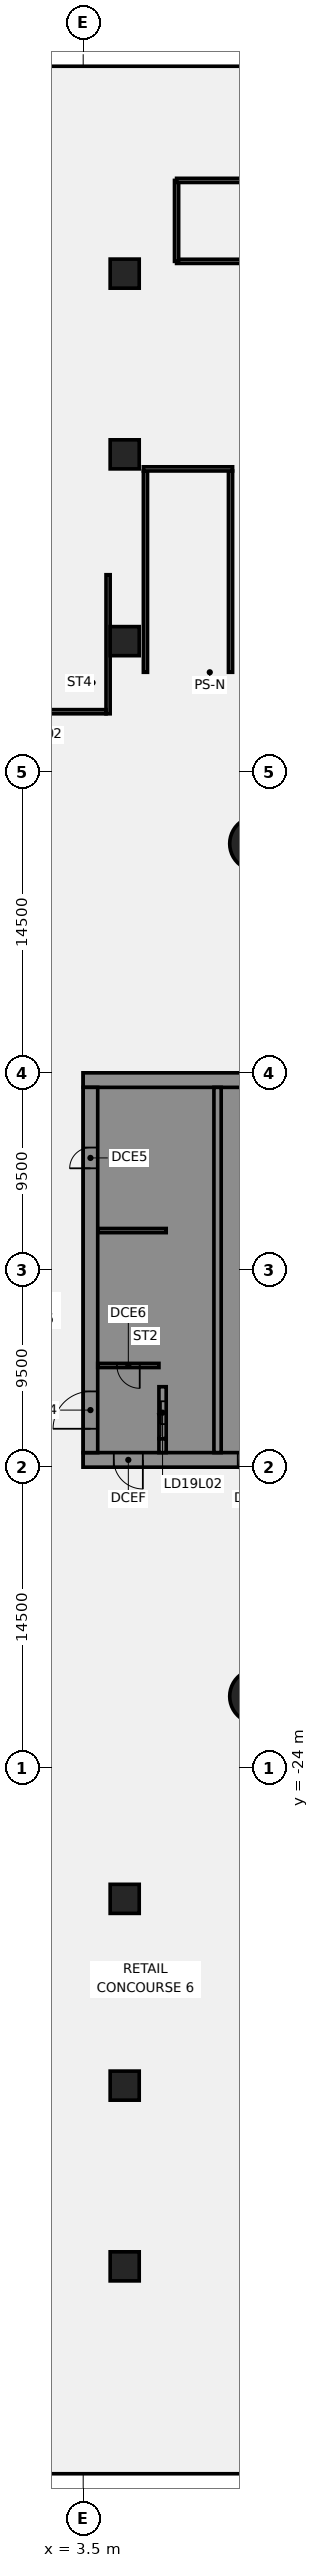
"""IFC4 building model, lengths in metres.
Left out: names, types, materials, properties, quantities, classifications, styles, units other than length and angle.
Written with IfcOpenShell. Run it as: python <this file> out.ifc"""

import sys

from ifc_helpers import new_model, si_unit, direction, frame, frame_2d, origin, origin_2d, place, context, subcontext, project, spatial, polyline, rectangle, circle, outline, extrude, element, fill, save


model = new_model("IFC4")
c1 = context("Model", 3, precision=1e-05, world=origin(), true_north=direction((0.0, 1.0)))
c2 = subcontext(c1, "Body", "Model", "MODEL_VIEW")
j1 = project(units=[si_unit("LENGTHUNIT", "METRE"), si_unit("PLANEANGLEUNIT", "RADIAN")], contexts=[c1])
p1 = place(None, origin())
s1 = spatial("IfcSite", under=j1, at=p1, CompositionType="ELEMENT")
p2 = place(p1, origin())
s2 = spatial("IfcBuilding", under=s1, at=p2, CompositionType="ELEMENT")
p3 = place(p2, frame((0.0, 0.0, 15.0)))
s3 = spatial("IfcBuildingStorey", under=s2, at=p3, CompositionType="ELEMENT", Elevation=15.0)
for number, where, z_axis, x_axis in (
    (1, (11.86, 20.543, -0.5), (0.0, 0.0, 1.0), (1.0, 0.0, 0.0)),
    (2, (11.86, -20.543, -0.5), (0.0, 0.0, 1.0), (1.0, 0.0, 0.0)),
):
    element("IfcColumn", number, at=place(p3, frame(where, z_axis=z_axis, x_axis=x_axis)), inside=s3, PredefinedType="COLUMN", context=c2, shape_type="SweptSolid", body=[
        extrude(circle(Radius=1.3, at=origin_2d()), origin(), (0.0, 0.0, 1.0), 5.0),
    ])
for number, where, z_axis, x_axis in (
    (3, (5.5, 39.3, -0.5), (0.0, 0.0, 1.0), (1.0, 0.0, 0.0)),
    (4, (5.5, 30.3, -0.5), (0.0, 0.0, 1.0), (1.0, 0.0, 0.0)),
    (5, (5.5, 48.008, -0.5), (0.0, 0.0, 1.0), (1.0, 0.0, 0.0)),
    (6, (5.5, -39.3, -0.5), (0.0, 0.0, 1.0), (1.0, 0.0, 0.0)),
    (7, (5.5, -30.3, -0.5), (0.0, 0.0, 1.0), (1.0, 0.0, 0.0)),
    (8, (5.5, -48.008, -0.5), (0.0, 0.0, 1.0), (1.0, 0.0, 0.0)),
):
    element("IfcColumn", number, at=place(p3, frame(where, z_axis=z_axis, x_axis=x_axis)), inside=s3, PredefinedType="COLUMN", context=c2, shape_type="SweptSolid", body=[
        extrude(rectangle(XDim=1.4, YDim=1.4, at=origin_2d()), origin(), (0.0, 0.0, 1.0), 5.0),
    ])
p4 = place(p3, frame((8.0, 48.6, 0.0), z_axis=(0.0, 0.0, 1.0), x_axis=(1.0, 0.0, 0.0)))
e9 = element("IfcWall", 9, at=p4, inside=s3, PredefinedType="PARTITIONING", context=c2, shape_type="SweptSolid", body=[
    extrude(rectangle(XDim=11.5, YDim=0.2, at=frame_2d((5.75, 0.0))), origin(), (0.0, 0.0, 1.0), 4.5),
])
p5 = place(p4, frame((9.78, 0.0, 0.0)))
e10 = element("IfcOpeningElement", 10, at=p5, cuts=e9, PredefinedType="OPENING", context=c2, shape_type="SweptSolid", body=[
    extrude(rectangle(XDim=1.2, YDim=2.1, at=frame_2d((0.6, 1.05))), frame((0.0, 0.11, 0.0), z_axis=(0.0, -1.0, 0.0), x_axis=(1.0, 0.0, 0.0)), (0.0, 0.0, 1.0), 0.22),
])
p6 = place(p3, frame((8.0, 48.6, 0.0), z_axis=(0.0, 0.0, 1.0), x_axis=(0.0, 1.0, 0.0)))
e11 = element("IfcWall", 11, at=p6, inside=s3, PredefinedType="PARTITIONING", context=c2, shape_type="SweptSolid", body=[
    extrude(rectangle(XDim=3.9, YDim=0.2, at=frame_2d((1.95, 0.0))), origin(), (0.0, 0.0, 1.0), 4.5),
])
p7 = place(p3, frame((8.0, 52.5, 0.0), z_axis=(0.0, 0.0, 1.0), x_axis=(1.0, 0.0, 0.0)))
e12 = element("IfcWall", 12, at=p7, inside=s3, PredefinedType="PARTITIONING", context=c2, shape_type="SweptSolid", body=[
    extrude(rectangle(XDim=11.5, YDim=0.2, at=frame_2d((5.75, 0.0))), origin(), (0.0, 0.0, 1.0), 4.5),
])
for number, where, z_axis, x_axis in (
    (13, (10.6, 28.8, 0.0), (0.0, 0.0, 1.0), (0.0, 1.0, 0.0)),
    (14, (6.5, 28.8, 0.0), (0.0, 0.0, 1.0), (0.0, 1.0, 0.0)),
):
    element("IfcWall", number, at=place(p3, frame(where, z_axis=z_axis, x_axis=x_axis)), inside=s3, PredefinedType="SOLIDWALL", context=c2, shape_type="SweptSolid", body=[
        extrude(rectangle(XDim=9.7, YDim=0.2, at=frame_2d((4.85, 0.0))), origin(), (0.0, 0.0, 1.0), 4.5),
    ])
p8 = place(p3, frame((10.7, 38.6, 0.0), z_axis=(0.0, 0.0, 1.0), x_axis=(-1.0, 0.0, 0.0)))
e15 = element("IfcWall", 15, at=p8, inside=s3, PredefinedType="SOLIDWALL", context=c2, shape_type="SweptSolid", body=[
    extrude(rectangle(XDim=4.3, YDim=0.2, at=frame_2d((2.15, 0.0))), origin(), (0.0, 0.0, 1.0), 4.5),
])
p9 = place(p3, frame((16.5, -9.15, 0.0), z_axis=(0.0, 0.0, 1.0), x_axis=(-1.0, 0.0, 0.0)))
e16 = element("IfcWall", 16, at=p9, inside=s3, PredefinedType="SHEAR", context=c2, shape_type="SweptSolid", body=[
    extrude(rectangle(XDim=13.0, YDim=0.7, at=frame_2d((6.5, 0.0))), origin(), (0.0, 0.0, 1.0), 4.5),
])
p10 = place(p9, frame((4.15, 0.0, 0.0)))
e17 = element("IfcOpeningElement", 17, at=p10, cuts=e16, PredefinedType="OPENING", context=c2, shape_type="SweptSolid", body=[
    extrude(rectangle(XDim=1.4, YDim=2.1, at=frame_2d((0.7, 1.05))), frame((0.0, 0.36, 0.0), z_axis=(0.0, -1.0, 0.0), x_axis=(1.0, 0.0, 0.0)), (0.0, 0.0, 1.0), 0.72),
])
p11 = place(p9, frame((10.125, 0.0, 0.0)))
e18 = element("IfcOpeningElement", 18, at=p11, cuts=e16, PredefinedType="OPENING", context=c2, shape_type="SweptSolid", body=[
    extrude(rectangle(XDim=1.4, YDim=2.1, at=frame_2d((0.7, 1.05))), frame((0.0, 0.36, 0.0), z_axis=(0.0, -1.0, 0.0), x_axis=(1.0, 0.0, 0.0)), (0.0, 0.0, 1.0), 0.72),
])
p12 = place(p3, frame((16.5, 9.15, 0.0), z_axis=(0.0, 0.0, 1.0), x_axis=(-1.0, 0.0, 0.0)))
e19 = element("IfcWall", 19, at=p12, inside=s3, PredefinedType="SHEAR", context=c2, shape_type="SweptSolid", body=[
    extrude(rectangle(XDim=13.0, YDim=0.7, at=frame_2d((6.5, 0.0))), origin(), (0.0, 0.0, 1.0), 4.5),
])
p13 = place(p3, origin())
e20 = element("IfcWall", 20, at=p13, inside=s3, PredefinedType="SHEAR", context=c2, shape_type="SweptSolid", body=[
    extrude(outline(polyline([(9.8, -5.375), (7.5, -5.375), (7.5, -2.875), (9.8, -2.875), (9.8, -2.625), (7.5, -2.625), (7.5, -0.125), (9.8, -0.125), (9.8, 0.125), (7.5, 0.125), (7.5, 2.625), (9.8, 2.625), (9.8, 2.875), (7.5, 2.875), (7.5, 5.375), (9.8, 5.375), (9.8, 5.625), (7.5, 5.625), (7.5, 8.125), (9.8, 8.125), (9.8, 8.8), (7.5, 8.8), (7.15, 8.8), (7.15, -5.625), (7.5, -5.625), (9.8, -5.625), (9.8, -5.375)])), origin(), (0.0, 0.0, 1.0), 4.5),
])
p14 = place(p3, origin())
e21 = element("IfcWall", 21, at=p14, inside=s3, PredefinedType="SHEAR", context=c2, shape_type="SweptSolid", body=[
    extrude(outline(polyline([(7.5, -8.125), (7.5, -8.8), (9.8, -8.8), (9.8, -8.125), (9.8, -5.625), (9.55, -5.625), (9.55, -8.125), (7.5, -8.125)])), origin(), (0.0, 0.0, 1.0), 4.5),
])
p15 = place(p3, frame((7.325, -8.8, 0.0), z_axis=(0.0, 0.0, 1.0), x_axis=(0.0, 1.0, 0.0)))
e22 = element("IfcWall", 22, at=p15, inside=s3, PredefinedType="SHEAR", context=c2, shape_type="SweptSolid", body=[
    extrude(rectangle(XDim=0.675, YDim=0.35, at=frame_2d((0.337, 0.0))), origin(), (0.0, 0.0, 1.0), 4.5),
])
p16 = place(p3, frame((7.5, 1.9, 0.0), z_axis=(0.0, 0.0, 1.0), x_axis=(-1.0, 0.0, 0.0)))
e23 = element("IfcWall", 23, at=p16, inside=s3, PredefinedType="SHEAR", context=c2, shape_type="SweptSolid", body=[
    extrude(rectangle(XDim=3.3, YDim=0.2, at=frame_2d((1.65, 0.0))), origin(), (0.0, 0.0, 1.0), 4.5),
])
p17 = place(p3, frame((9.975, -8.8, 0.0), z_axis=(0.0, 0.0, 1.0), x_axis=(0.0, 1.0, 0.0)))
e24 = element("IfcWall", 24, at=p17, inside=s3, PredefinedType="SHEAR", context=c2, shape_type="SweptSolid", body=[
    extrude(rectangle(XDim=17.6, YDim=0.35, at=frame_2d((8.8, 0.0))), origin(), (0.0, 0.0, 1.0), 4.5),
])
p18 = place(p3, frame((7.325, -8.125, 0.0), z_axis=(0.0, 0.0, 1.0), x_axis=(0.0, 1.0, 0.0)))
e25 = element("IfcWall", 25, at=p18, inside=s3, PredefinedType="SHEAR", context=c2, shape_type="SweptSolid", body=[
    extrude(rectangle(XDim=2.5, YDim=0.35, at=frame_2d((1.25, 0.0))), origin(), (0.0, 0.0, 1.0), 4.5),
])
p19 = place(p18, frame((0.7, 0.0, 0.0)))
e26 = element("IfcOpeningElement", 26, at=p19, cuts=e25, PredefinedType="OPENING", context=c2, shape_type="SweptSolid", body=[
    extrude(rectangle(XDim=1.1, YDim=2.1, at=frame_2d((0.55, 1.05))), frame((0.0, 0.185, 0.0), z_axis=(0.0, -1.0, 0.0), x_axis=(1.0, 0.0, 0.0)), (0.0, 0.0, 1.0), 0.37),
])
p20 = place(p3, frame((3.85, -8.8, 0.0), z_axis=(0.0, 0.0, 1.0), x_axis=(0.0, 1.0, 0.0)))
e27 = element("IfcWall", 27, at=p20, inside=s3, PredefinedType="SHEAR", context=c2, shape_type="SweptSolid", body=[
    extrude(rectangle(XDim=17.6, YDim=0.7, at=frame_2d((8.8, 0.0))), origin(), (0.0, 0.0, 1.0), 4.5),
])
p21 = place(p20, frame((1.15, 0.0, 0.0)))
e28 = element("IfcOpeningElement", 28, at=p21, cuts=e27, PredefinedType="OPENING", context=c2, shape_type="SweptSolid", body=[
    extrude(rectangle(XDim=1.8, YDim=2.1, at=frame_2d((0.9, 1.05))), frame((0.0, 0.36, 0.0), z_axis=(0.0, -1.0, 0.0), x_axis=(1.0, 0.0, 0.0)), (0.0, 0.0, 1.0), 0.72),
])
p22 = place(p20, frame((13.7, 0.0, 0.0)))
e29 = element("IfcOpeningElement", 29, at=p22, cuts=e27, PredefinedType="OPENING", context=c2, shape_type="SweptSolid", body=[
    extrude(rectangle(XDim=1.0, YDim=2.1, at=frame_2d((0.5, 1.05))), frame((0.0, 0.36, 0.0), z_axis=(0.0, -1.0, 0.0), x_axis=(1.0, 0.0, 0.0)), (0.0, 0.0, 1.0), 0.72),
])
p23 = place(p3, frame((7.15, -4.6, 0.0), z_axis=(0.0, 0.0, 1.0), x_axis=(-1.0, 0.0, 0.0)))
e30 = element("IfcWall", 30, at=p23, inside=s3, PredefinedType="SHEAR", context=c2, shape_type="SweptSolid", body=[
    extrude(rectangle(XDim=2.95, YDim=0.2, at=frame_2d((1.475, 0.0))), origin(), (0.0, 0.0, 1.0), 4.5),
])
p24 = place(p23, frame((0.925, 0.0, 0.0)))
e31 = element("IfcOpeningElement", 31, at=p24, cuts=e30, PredefinedType="OPENING", context=c2, shape_type="SweptSolid", body=[
    extrude(rectangle(XDim=1.1, YDim=2.1, at=frame_2d((0.55, 1.05))), frame((0.0, 0.11, 0.0), z_axis=(0.0, -1.0, 0.0), x_axis=(1.0, 0.0, 0.0)), (0.0, 0.0, 1.0), 0.22),
])
p25 = place(p3, frame((4.7, 26.8, 0.0), z_axis=(0.0, 0.0, 1.0), x_axis=(0.0, 1.0, 0.0)))
e32 = element("IfcWall", 32, at=p25, inside=s3, PredefinedType="SHEAR", context=c2, shape_type="SweptSolid", body=[
    extrude(rectangle(XDim=6.7, YDim=0.2, at=frame_2d((3.35, 0.0))), origin(), (0.0, 0.0, 1.0), 4.5),
])
p26 = place(p3, frame((4.6, 26.9, 0.0), z_axis=(0.0, 0.0, 1.0), x_axis=(-1.0, 0.0, 0.0)))
e33 = element("IfcWall", 33, at=p26, inside=s3, PredefinedType="SHEAR", context=c2, shape_type="SweptSolid", body=[
    extrude(rectangle(XDim=3.2, YDim=0.2, at=frame_2d((1.6, 0.0))), origin(), (0.0, 0.0, 1.0), 4.5),
])
p27 = place(p3, origin())
e34 = element("IfcWall", 34, at=p27, inside=s3, PredefinedType="SHEAR", context=c2, shape_type="SweptSolid", body=[
    extrude(outline(polyline([(4.6, 33.3), (4.6, 33.5), (1.4, 33.5), (1.4, 33.3), (4.6, 33.3)])), origin(), (0.0, 0.0, 1.0), 4.5),
])
p28 = place(p10, origin())
e35 = element("IfcDoor", 35, at=p28, inside=s3, OperationType="SINGLE_SWING_LEFT", PredefinedType="DOOR", context=c2, shape_type="SweptSolid", body=[
    extrude(rectangle(XDim=1.4, YDim=2.1, at=frame_2d((0.7, 1.05))), frame((0.0, 0.025, 0.0), z_axis=(0.0, -1.0, 0.0), x_axis=(1.0, 0.0, 0.0)), (0.0, 0.0, 1.0), 0.05),
])
fill(e17, e35)
p29 = place(p11, origin())
e36 = element("IfcDoor", 36, at=p29, inside=s3, OperationType="SINGLE_SWING_LEFT", PredefinedType="DOOR", context=c2, shape_type="SweptSolid", body=[
    extrude(rectangle(XDim=1.4, YDim=2.1, at=frame_2d((0.7, 1.05))), frame((0.0, 0.025, 0.0), z_axis=(0.0, -1.0, 0.0), x_axis=(1.0, 0.0, 0.0)), (0.0, 0.0, 1.0), 0.05),
])
fill(e18, e36)
p30 = place(p21, origin())
e37 = element("IfcDoor", 37, at=p30, inside=s3, OperationType="SINGLE_SWING_LEFT", PredefinedType="DOOR", context=c2, shape_type="SweptSolid", body=[
    extrude(rectangle(XDim=1.8, YDim=2.1, at=frame_2d((0.9, 1.05))), frame((0.0, 0.025, 0.0), z_axis=(0.0, -1.0, 0.0), x_axis=(1.0, 0.0, 0.0)), (0.0, 0.0, 1.0), 0.05),
])
fill(e28, e37)
p31 = place(p22, origin())
e38 = element("IfcDoor", 38, at=p31, inside=s3, OperationType="SINGLE_SWING_LEFT", PredefinedType="DOOR", context=c2, shape_type="SweptSolid", body=[
    extrude(rectangle(XDim=1.0, YDim=2.1, at=frame_2d((0.5, 1.05))), frame((0.0, 0.025, 0.0), z_axis=(0.0, -1.0, 0.0), x_axis=(1.0, 0.0, 0.0)), (0.0, 0.0, 1.0), 0.05),
])
fill(e29, e38)
p32 = place(p24, origin())
e39 = element("IfcDoor", 39, at=p32, inside=s3, OperationType="SINGLE_SWING_LEFT", PredefinedType="DOOR", context=c2, shape_type="SweptSolid", body=[
    extrude(rectangle(XDim=1.1, YDim=2.1, at=frame_2d((0.55, 1.05))), frame((0.0, 0.025, 0.0), z_axis=(0.0, -1.0, 0.0), x_axis=(1.0, 0.0, 0.0)), (0.0, 0.0, 1.0), 0.05),
])
fill(e31, e39)
p33 = place(p19, origin())
e40 = element("IfcDoor", 40, at=p33, inside=s3, OperationType="SLIDING_TO_LEFT", PredefinedType="DOOR", context=c2, shape_type="SweptSolid", body=[
    extrude(rectangle(XDim=1.1, YDim=2.1, at=frame_2d((0.55, 1.05))), frame((0.0, 0.025, 0.0), z_axis=(0.0, -1.0, 0.0), x_axis=(1.0, 0.0, 0.0)), (0.0, 0.0, 1.0), 0.05),
])
fill(e26, e40)
save(model, sys.argv[1])
